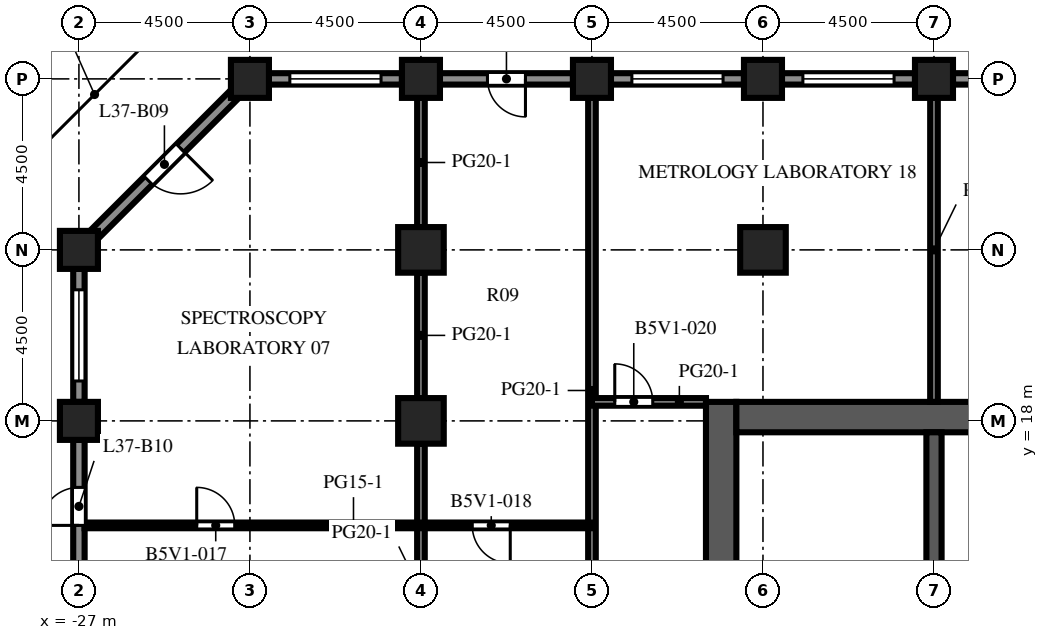
"""IFC4 building model, lengths in metres.
Left out: names, types, materials, properties, quantities, classifications, styles, units other than length and angle.
Written with IfcOpenShell. Run it as: python <this file> out.ifc"""

import sys

from ifc_helpers import new_model, si_unit, direction, frame, frame_2d, origin, origin_2d, place, context, subcontext, project, spatial, rectangle, extrude, element, fill, save


model = new_model("IFC4")
c1 = context("Model", 3, precision=1e-05, world=origin(), true_north=direction((0.0, 1.0)))
c2 = subcontext(c1, "Body", "Model", "MODEL_VIEW")
j1 = project(units=[si_unit("LENGTHUNIT", "METRE"), si_unit("PLANEANGLEUNIT", "RADIAN")], contexts=[c1])
p1 = place(None, origin())
s1 = spatial("IfcSite", under=j1, at=p1, CompositionType="ELEMENT")
p2 = place(p1, origin())
s2 = spatial("IfcBuilding", under=s1, at=p2, CompositionType="ELEMENT")
p3 = place(p2, frame((0.0, 0.0, 165.0)))
s3 = spatial("IfcBuildingStorey", under=s2, at=p3, CompositionType="ELEMENT", Elevation=165.0)
for number, where, z_axis, x_axis in (
    (1, (-27.0, 18.0, 0.0), (0.0, 0.0, 1.0), (1.0, 0.0, 0.0)),
    (2, (-27.0, 22.5, 0.0), (0.0, 0.0, 1.0), (1.0, 0.0, 0.0)),
    (3, (-22.5, 27.0, 0.0), (0.0, 0.0, 1.0), (1.0, 0.0, 0.0)),
    (4, (-18.0, 27.0, 0.0), (0.0, 0.0, 1.0), (1.0, 0.0, 0.0)),
    (5, (-13.5, 27.0, 0.0), (0.0, 0.0, 1.0), (1.0, 0.0, 0.0)),
    (6, (-9.0, 27.0, 0.0), (0.0, 0.0, 1.0), (1.0, 0.0, 0.0)),
    (7, (-4.5, 27.0, 0.0), (0.0, 0.0, 1.0), (1.0, 0.0, 0.0)),
):
    element("IfcColumn", number, at=place(p3, frame(where, z_axis=z_axis, x_axis=x_axis)), inside=s3, PredefinedType="COLUMN", context=c2, shape_type="SweptSolid", body=[
        extrude(rectangle(XDim=1.0, YDim=1.0, at=origin_2d()), origin(), (0.0, 0.0, 1.0), 4.1),
    ])
for number, where, z_axis, x_axis in (
    (8, (-18.0, 18.0, 0.0), (0.0, 0.0, 1.0), (1.0, 0.0, 0.0)),
    (9, (-18.0, 22.5, 0.0), (0.0, 0.0, 1.0), (1.0, 0.0, 0.0)),
    (10, (-9.0, 22.5, 0.0), (0.0, 0.0, 1.0), (1.0, 0.0, 0.0)),
):
    element("IfcColumn", number, at=place(p3, frame(where, z_axis=z_axis, x_axis=x_axis)), inside=s3, PredefinedType="COLUMN", context=c2, shape_type="SweptSolid", body=[
        extrude(rectangle(XDim=1.2, YDim=1.2, at=origin_2d()), origin(), (0.0, 0.0, 1.0), 4.1),
    ])
p4 = place(p3, frame((-10.1, -9.0, 0.0), z_axis=(0.0, 0.0, 1.0), x_axis=(0.0, 1.0, 0.0)))
e11 = element("IfcWall", 11, at=p4, inside=s3, PredefinedType="SHEAR", context=c2, shape_type="SweptSolid", body=[
    extrude(rectangle(XDim=27.5, YDim=0.8, at=frame_2d((13.75, 0.0))), origin(), (0.0, 0.0, 1.0), 4.1),
])
p5 = place(p4, frame((12.55, 0.0, 0.0)))
e12 = element("IfcOpeningElement", 12, at=p5, cuts=e11, PredefinedType="OPENING", context=c2, shape_type="SweptSolid", body=[
    extrude(rectangle(XDim=2.4, YDim=2.4, at=frame_2d((1.2, 1.2))), frame((0.0, 0.41, 0.0), z_axis=(0.0, -1.0, 0.0), x_axis=(1.0, 0.0, 0.0)), (0.0, 0.0, 1.0), 0.82),
])
p6 = place(p4, frame((6.825, 0.0, 0.0)))
e13 = element("IfcOpeningElement", 13, at=p6, cuts=e11, PredefinedType="OPENING", context=c2, shape_type="SweptSolid", body=[
    extrude(rectangle(XDim=1.2, YDim=2.1, at=frame_2d((0.6, 1.05))), frame((0.0, 0.41, 0.0), z_axis=(0.0, -1.0, 0.0), x_axis=(1.0, 0.0, 0.0)), (0.0, 0.0, 1.0), 0.82),
])
p7 = place(p4, frame((19.475, 0.0, 0.0)))
e14 = element("IfcOpeningElement", 14, at=p7, cuts=e11, PredefinedType="OPENING", context=c2, shape_type="SweptSolid", body=[
    extrude(rectangle(XDim=1.2, YDim=2.1, at=frame_2d((0.6, 1.05))), frame((0.0, 0.41, 0.0), z_axis=(0.0, -1.0, 0.0), x_axis=(1.0, 0.0, 0.0)), (0.0, 0.0, 1.0), 0.82),
])
p8 = place(p3, frame((-9.7, 18.1, 0.0), z_axis=(0.0, 0.0, 1.0), x_axis=(1.0, 0.0, 0.0)))
e15 = element("IfcWall", 15, at=p8, inside=s3, PredefinedType="SHEAR", context=c2, shape_type="SweptSolid", body=[
    extrude(rectangle(XDim=10.4, YDim=0.8, at=frame_2d((5.2, 0.0))), origin(), (0.0, 0.0, 1.0), 4.1),
])
p9 = place(p3, frame((-4.5, 10.2, 0.0), z_axis=(0.0, 0.0, 1.0), x_axis=(0.0, 1.0, 0.0)))
e16 = element("IfcWall", 16, at=p9, inside=s3, PredefinedType="SHEAR", context=c2, shape_type="SweptSolid", body=[
    extrude(rectangle(XDim=7.5, YDim=0.4, at=frame_2d((3.75, 0.0))), origin(), (0.0, 0.0, 1.0), 4.1),
])
p10 = place(p3, frame((-4.0, 27.0, 0.0), z_axis=(0.0, 0.0, 1.0), x_axis=(1.0, 0.0, 0.0)))
e17 = element("IfcWall", 17, at=p10, inside=s3, PredefinedType="SOLIDWALL", context=c2, shape_type="SweptSolid", body=[
    extrude(rectangle(XDim=3.5, YDim=0.3, at=frame_2d((1.75, 0.0))), origin(), (0.0, 0.0, 1.0), 2.85),
])
p11 = place(p10, frame((0.55, 0.0, 0.8)))
e18 = element("IfcOpeningElement", 18, at=p11, cuts=e17, PredefinedType="OPENING", context=c2, shape_type="SweptSolid", body=[
    extrude(rectangle(XDim=2.4, YDim=1.7, at=frame_2d((1.2, 0.85))), frame((0.0, 0.16, 0.0), z_axis=(0.0, -1.0, 0.0), x_axis=(1.0, 0.0, 0.0)), (0.0, 0.0, 1.0), 0.32),
])
p12 = place(p3, frame((-8.5, 27.0, 0.0), z_axis=(0.0, 0.0, 1.0), x_axis=(1.0, 0.0, 0.0)))
e19 = element("IfcWall", 19, at=p12, inside=s3, PredefinedType="SOLIDWALL", context=c2, shape_type="SweptSolid", body=[
    extrude(rectangle(XDim=3.5, YDim=0.3, at=frame_2d((1.75, 0.0))), origin(), (0.0, 0.0, 1.0), 2.85),
])
p13 = place(p12, frame((0.55, 0.0, 0.8)))
e20 = element("IfcOpeningElement", 20, at=p13, cuts=e19, PredefinedType="OPENING", context=c2, shape_type="SweptSolid", body=[
    extrude(rectangle(XDim=2.4, YDim=1.7, at=frame_2d((1.2, 0.85))), frame((0.0, 0.16, 0.0), z_axis=(0.0, -1.0, 0.0), x_axis=(1.0, 0.0, 0.0)), (0.0, 0.0, 1.0), 0.32),
])
p14 = place(p3, frame((-13.0, 27.0, 0.0), z_axis=(0.0, 0.0, 1.0), x_axis=(1.0, 0.0, 0.0)))
e21 = element("IfcWall", 21, at=p14, inside=s3, PredefinedType="SOLIDWALL", context=c2, shape_type="SweptSolid", body=[
    extrude(rectangle(XDim=3.5, YDim=0.3, at=frame_2d((1.75, 0.0))), origin(), (0.0, 0.0, 1.0), 2.85),
])
p15 = place(p14, frame((0.55, 0.0, 0.8)))
e22 = element("IfcOpeningElement", 22, at=p15, cuts=e21, PredefinedType="OPENING", context=c2, shape_type="SweptSolid", body=[
    extrude(rectangle(XDim=2.4, YDim=1.7, at=frame_2d((1.2, 0.85))), frame((0.0, 0.16, 0.0), z_axis=(0.0, -1.0, 0.0), x_axis=(1.0, 0.0, 0.0)), (0.0, 0.0, 1.0), 0.32),
])
p16 = place(p3, frame((-17.5, 27.0, 0.0), z_axis=(0.0, 0.0, 1.0), x_axis=(1.0, 0.0, 0.0)))
e23 = element("IfcWall", 23, at=p16, inside=s3, PredefinedType="SOLIDWALL", context=c2, shape_type="SweptSolid", body=[
    extrude(rectangle(XDim=3.5, YDim=0.3, at=frame_2d((1.75, 0.0))), origin(), (0.0, 0.0, 1.0), 2.85),
])
p17 = place(p16, frame((1.25, 0.0, 0.0)))
e24 = element("IfcOpeningElement", 24, at=p17, cuts=e23, PredefinedType="OPENING", context=c2, shape_type="SweptSolid", body=[
    extrude(rectangle(XDim=1.0, YDim=2.2, at=frame_2d((0.5, 1.1))), frame((0.0, 0.16, 0.0), z_axis=(0.0, -1.0, 0.0), x_axis=(1.0, 0.0, 0.0)), (0.0, 0.0, 1.0), 0.32),
])
p18 = place(p3, frame((-22.0, 27.0, 0.0), z_axis=(0.0, 0.0, 1.0), x_axis=(1.0, 0.0, 0.0)))
e25 = element("IfcWall", 25, at=p18, inside=s3, PredefinedType="SOLIDWALL", context=c2, shape_type="SweptSolid", body=[
    extrude(rectangle(XDim=3.5, YDim=0.3, at=frame_2d((1.75, 0.0))), origin(), (0.0, 0.0, 1.0), 2.85),
])
p19 = place(p18, frame((0.55, 0.0, 0.8)))
e26 = element("IfcOpeningElement", 26, at=p19, cuts=e25, PredefinedType="OPENING", context=c2, shape_type="SweptSolid", body=[
    extrude(rectangle(XDim=2.4, YDim=1.7, at=frame_2d((1.2, 0.85))), frame((0.0, 0.16, 0.0), z_axis=(0.0, -1.0, 0.0), x_axis=(1.0, 0.0, 0.0)), (0.0, 0.0, 1.0), 0.32),
])
p20 = place(p3, frame((-26.606, 22.894, 0.0), z_axis=(0.0, 0.0, 1.0), x_axis=(0.707106781187, 0.707106781187, 0.0)))
e27 = element("IfcWall", 27, at=p20, inside=s3, PredefinedType="SOLIDWALL", context=c2, shape_type="SweptSolid", body=[
    extrude(rectangle(XDim=5.25, YDim=0.3, at=frame_2d((2.625, 0.0))), origin(), (0.0, 0.0, 1.0), 2.85),
])
p21 = place(p20, frame((2.025, 0.0, 0.0)))
e28 = element("IfcOpeningElement", 28, at=p21, cuts=e27, PredefinedType="OPENING", context=c2, shape_type="SweptSolid", body=[
    extrude(rectangle(XDim=1.2, YDim=2.2, at=frame_2d((0.6, 1.1))), frame((0.0, 0.16, 0.0), z_axis=(0.0, -1.0, 0.0), x_axis=(1.0, 0.0, 0.0)), (0.0, 0.0, 1.0), 0.32),
])
p22 = place(p3, frame((-27.0, 18.5, 0.0), z_axis=(0.0, 0.0, 1.0), x_axis=(0.0, 1.0, 0.0)))
e29 = element("IfcWall", 29, at=p22, inside=s3, PredefinedType="SOLIDWALL", context=c2, shape_type="SweptSolid", body=[
    extrude(rectangle(XDim=3.5, YDim=0.3, at=frame_2d((1.75, 0.0))), origin(), (0.0, 0.0, 1.0), 2.85),
])
p23 = place(p22, frame((0.55, 0.0, 0.8)))
e30 = element("IfcOpeningElement", 30, at=p23, cuts=e29, PredefinedType="OPENING", context=c2, shape_type="SweptSolid", body=[
    extrude(rectangle(XDim=2.4, YDim=1.7, at=frame_2d((1.2, 0.85))), frame((0.0, 0.16, 0.0), z_axis=(0.0, -1.0, 0.0), x_axis=(1.0, 0.0, 0.0)), (0.0, 0.0, 1.0), 0.32),
])
p24 = place(p3, frame((-27.0, 14.0, 0.0), z_axis=(0.0, 0.0, 1.0), x_axis=(0.0, 1.0, 0.0)))
e31 = element("IfcWall", 31, at=p24, inside=s3, PredefinedType="SOLIDWALL", context=c2, shape_type="SweptSolid", body=[
    extrude(rectangle(XDim=3.5, YDim=0.3, at=frame_2d((1.75, 0.0))), origin(), (0.0, 0.0, 1.0), 2.85),
])
p25 = place(p24, frame((1.25, 0.0, 0.0)))
e32 = element("IfcOpeningElement", 32, at=p25, cuts=e31, PredefinedType="OPENING", context=c2, shape_type="SweptSolid", body=[
    extrude(rectangle(XDim=1.0, YDim=2.2, at=frame_2d((0.5, 1.1))), frame((0.0, 0.16, 0.0), z_axis=(0.0, -1.0, 0.0), x_axis=(1.0, 0.0, 0.0)), (0.0, 0.0, 1.0), 0.32),
])
p26 = place(p3, frame((-4.3, 14.85, 0.0), z_axis=(0.0, 0.0, 1.0), x_axis=(1.0, 0.0, 0.0)))
e33 = element("IfcWall", 33, at=p26, inside=s3, PredefinedType="PARTITIONING", context=c2, shape_type="SweptSolid", body=[
    extrude(rectangle(XDim=3.6, YDim=0.1, at=frame_2d((1.8, 0.0))), origin(), (0.0, 0.0, 1.0), 3.65),
])
p27 = place(p3, frame((-18.0, 9.6, 0.0), z_axis=(0.0, 0.0, 1.0), x_axis=(0.0, 1.0, 0.0)))
e34 = element("IfcWall", 34, at=p27, inside=s3, PredefinedType="PARTITIONING", context=c2, shape_type="SweptSolid", body=[
    extrude(rectangle(XDim=7.8, YDim=0.2, at=frame_2d((3.9, 0.0))), origin(), (0.0, 0.0, 1.0), 3.65),
])
p28 = place(p3, frame((-18.0, 18.6, 0.0), z_axis=(0.0, 0.0, 1.0), x_axis=(0.0, 1.0, 0.0)))
e35 = element("IfcWall", 35, at=p28, inside=s3, PredefinedType="PARTITIONING", context=c2, shape_type="SweptSolid", body=[
    extrude(rectangle(XDim=3.3, YDim=0.2, at=frame_2d((1.65, 0.0))), origin(), (0.0, 0.0, 1.0), 3.65),
])
p29 = place(p3, frame((-18.0, 23.1, 0.0), z_axis=(0.0, 0.0, 1.0), x_axis=(0.0, 1.0, 0.0)))
e36 = element("IfcWall", 36, at=p29, inside=s3, PredefinedType="PARTITIONING", context=c2, shape_type="SweptSolid", body=[
    extrude(rectangle(XDim=3.4, YDim=0.2, at=frame_2d((1.7, 0.0))), origin(), (0.0, 0.0, 1.0), 3.65),
])
p30 = place(p3, frame((-13.5, 6.25, 0.0), z_axis=(0.0, 0.0, 1.0), x_axis=(0.0, 1.0, 0.0)))
e37 = element("IfcWall", 37, at=p30, inside=s3, PredefinedType="PARTITIONING", context=c2, shape_type="SweptSolid", body=[
    extrude(rectangle(XDim=20.25, YDim=0.2, at=frame_2d((10.125, 0.0))), origin(), (0.0, 0.0, 1.0), 3.65),
])
p31 = place(p30, frame((3.85, 0.0, 0.0)))
e38 = element("IfcOpeningElement", 38, at=p31, cuts=e37, PredefinedType="OPENING", context=c2, shape_type="SweptSolid", body=[
    extrude(rectangle(XDim=1.0, YDim=2.1, at=frame_2d((0.5, 1.05))), frame((0.0, 0.11, 0.0), z_axis=(0.0, -1.0, 0.0), x_axis=(1.0, 0.0, 0.0)), (0.0, 0.0, 1.0), 0.22),
])
p32 = place(p3, frame((-4.5, 18.5, 0.0), z_axis=(0.0, 0.0, 1.0), x_axis=(0.0, 1.0, 0.0)))
e39 = element("IfcWall", 39, at=p32, inside=s3, PredefinedType="PARTITIONING", context=c2, shape_type="SweptSolid", body=[
    extrude(rectangle(XDim=8.0, YDim=0.2, at=frame_2d((4.0, 0.0))), origin(), (0.0, 0.0, 1.0), 3.65),
])
p33 = place(p3, frame((-26.85, 15.25, 0.0), z_axis=(0.0, 0.0, 1.0), x_axis=(1.0, 0.0, 0.0)))
e40 = element("IfcWall", 40, at=p33, inside=s3, PredefinedType="PARTITIONING", context=c2, shape_type="SweptSolid", body=[
    extrude(rectangle(XDim=13.35, YDim=0.15, at=frame_2d((6.675, 0.0))), origin(), (0.0, 0.0, 1.0), 3.65),
])
p34 = place(p33, frame((2.95, 0.0, 0.0)))
e41 = element("IfcOpeningElement", 41, at=p34, cuts=e40, PredefinedType="OPENING", context=c2, shape_type="SweptSolid", body=[
    extrude(rectangle(XDim=1.0, YDim=2.1, at=frame_2d((0.5, 1.05))), frame((0.0, 0.085, 0.0), z_axis=(0.0, -1.0, 0.0), x_axis=(1.0, 0.0, 0.0)), (0.0, 0.0, 1.0), 0.17),
])
p35 = place(p33, frame((10.2, 0.0, 0.0)))
e42 = element("IfcOpeningElement", 42, at=p35, cuts=e40, PredefinedType="OPENING", context=c2, shape_type="SweptSolid", body=[
    extrude(rectangle(XDim=1.0, YDim=2.1, at=frame_2d((0.5, 1.05))), frame((0.0, 0.085, 0.0), z_axis=(0.0, -1.0, 0.0), x_axis=(1.0, 0.0, 0.0)), (0.0, 0.0, 1.0), 0.17),
])
p36 = place(p3, frame((-13.5, 18.5, 0.0), z_axis=(0.0, 0.0, 1.0), x_axis=(1.0, 0.0, 0.0)))
e43 = element("IfcWall", 43, at=p36, inside=s3, PredefinedType="PARTITIONING", context=c2, shape_type="SweptSolid", body=[
    extrude(rectangle(XDim=3.0, YDim=0.2, at=frame_2d((1.5, 0.0))), origin(), (0.0, 0.0, 1.0), 3.65),
])
p37 = place(p36, frame((0.6, 0.0, 0.0)))
e44 = element("IfcOpeningElement", 44, at=p37, cuts=e43, PredefinedType="OPENING", context=c2, shape_type="SweptSolid", body=[
    extrude(rectangle(XDim=1.0, YDim=2.1, at=frame_2d((0.5, 1.05))), frame((0.0, 0.11, 0.0), z_axis=(0.0, -1.0, 0.0), x_axis=(1.0, 0.0, 0.0)), (0.0, 0.0, 1.0), 0.22),
])
p38 = place(p13, origin())
e45 = element("IfcWindow", 45, at=p38, inside=s3, PartitioningType="SINGLE_PANEL", PredefinedType="WINDOW", context=c2, shape_type="SweptSolid", body=[
    extrude(rectangle(XDim=2.4, YDim=1.7, at=frame_2d((1.2, 0.85))), frame((0.0, 0.03, 0.0), z_axis=(0.0, -1.0, 0.0), x_axis=(1.0, 0.0, 0.0)), (0.0, 0.0, 1.0), 0.06),
])
fill(e20, e45)
p39 = place(p15, origin())
e46 = element("IfcWindow", 46, at=p39, inside=s3, PartitioningType="SINGLE_PANEL", PredefinedType="WINDOW", context=c2, shape_type="SweptSolid", body=[
    extrude(rectangle(XDim=2.4, YDim=1.7, at=frame_2d((1.2, 0.85))), frame((0.0, 0.03, 0.0), z_axis=(0.0, -1.0, 0.0), x_axis=(1.0, 0.0, 0.0)), (0.0, 0.0, 1.0), 0.06),
])
fill(e22, e46)
p40 = place(p17, origin())
e47 = element("IfcDoor", 47, at=p40, inside=s3, OperationType="SINGLE_SWING_RIGHT", PredefinedType="DOOR", context=c2, shape_type="SweptSolid", body=[
    extrude(rectangle(XDim=1.0, YDim=2.2, at=frame_2d((0.5, 1.1))), frame((0.0, 0.025, 0.0), z_axis=(0.0, -1.0, 0.0), x_axis=(1.0, 0.0, 0.0)), (0.0, 0.0, 1.0), 0.05),
])
fill(e24, e47)
p41 = place(p19, origin())
e48 = element("IfcWindow", 48, at=p41, inside=s3, PartitioningType="SINGLE_PANEL", PredefinedType="WINDOW", context=c2, shape_type="SweptSolid", body=[
    extrude(rectangle(XDim=2.4, YDim=1.7, at=frame_2d((1.2, 0.85))), frame((0.0, 0.03, 0.0), z_axis=(0.0, -1.0, 0.0), x_axis=(1.0, 0.0, 0.0)), (0.0, 0.0, 1.0), 0.06),
])
fill(e26, e48)
p42 = place(p21, origin())
e49 = element("IfcDoor", 49, at=p42, inside=s3, OperationType="SINGLE_SWING_RIGHT", PredefinedType="DOOR", context=c2, shape_type="SweptSolid", body=[
    extrude(rectangle(XDim=1.2, YDim=2.2, at=frame_2d((0.6, 1.1))), frame((0.0, 0.025, 0.0), z_axis=(0.0, -1.0, 0.0), x_axis=(1.0, 0.0, 0.0)), (0.0, 0.0, 1.0), 0.05),
])
fill(e28, e49)
p43 = place(p23, origin())
e50 = element("IfcWindow", 50, at=p43, inside=s3, PartitioningType="SINGLE_PANEL", PredefinedType="WINDOW", context=c2, shape_type="SweptSolid", body=[
    extrude(rectangle(XDim=2.4, YDim=1.7, at=frame_2d((1.2, 0.85))), frame((0.0, 0.03, 0.0), z_axis=(0.0, -1.0, 0.0), x_axis=(1.0, 0.0, 0.0)), (0.0, 0.0, 1.0), 0.06),
])
fill(e30, e50)
p44 = place(p25, origin())
e51 = element("IfcDoor", 51, at=p44, inside=s3, OperationType="SINGLE_SWING_LEFT", PredefinedType="DOOR", context=c2, shape_type="SweptSolid", body=[
    extrude(rectangle(XDim=1.0, YDim=2.2, at=frame_2d((0.5, 1.1))), frame((0.0, 0.025, 0.0), z_axis=(0.0, -1.0, 0.0), x_axis=(1.0, 0.0, 0.0)), (0.0, 0.0, 1.0), 0.05),
])
fill(e32, e51)
p45 = place(p34, origin())
e52 = element("IfcDoor", 52, at=p45, inside=s3, OperationType="SINGLE_SWING_LEFT", PredefinedType="DOOR", context=c2, shape_type="SweptSolid", body=[
    extrude(rectangle(XDim=1.0, YDim=2.1, at=frame_2d((0.5, 1.05))), frame((0.0, 0.025, 0.0), z_axis=(0.0, -1.0, 0.0), x_axis=(1.0, 0.0, 0.0)), (0.0, 0.0, 1.0), 0.05),
])
fill(e41, e52)
p46 = place(p35, origin())
e53 = element("IfcDoor", 53, at=p46, inside=s3, OperationType="SINGLE_SWING_RIGHT", PredefinedType="DOOR", context=c2, shape_type="SweptSolid", body=[
    extrude(rectangle(XDim=1.0, YDim=2.1, at=frame_2d((0.5, 1.05))), frame((0.0, 0.025, 0.0), z_axis=(0.0, -1.0, 0.0), x_axis=(1.0, 0.0, 0.0)), (0.0, 0.0, 1.0), 0.05),
])
fill(e42, e53)
p47 = place(p37, origin())
e54 = element("IfcDoor", 54, at=p47, inside=s3, OperationType="SINGLE_SWING_LEFT", PredefinedType="DOOR", context=c2, shape_type="SweptSolid", body=[
    extrude(rectangle(XDim=1.0, YDim=2.1, at=frame_2d((0.5, 1.05))), frame((0.0, 0.025, 0.0), z_axis=(0.0, -1.0, 0.0), x_axis=(1.0, 0.0, 0.0)), (0.0, 0.0, 1.0), 0.05),
])
fill(e44, e54)
save(model, sys.argv[1])
